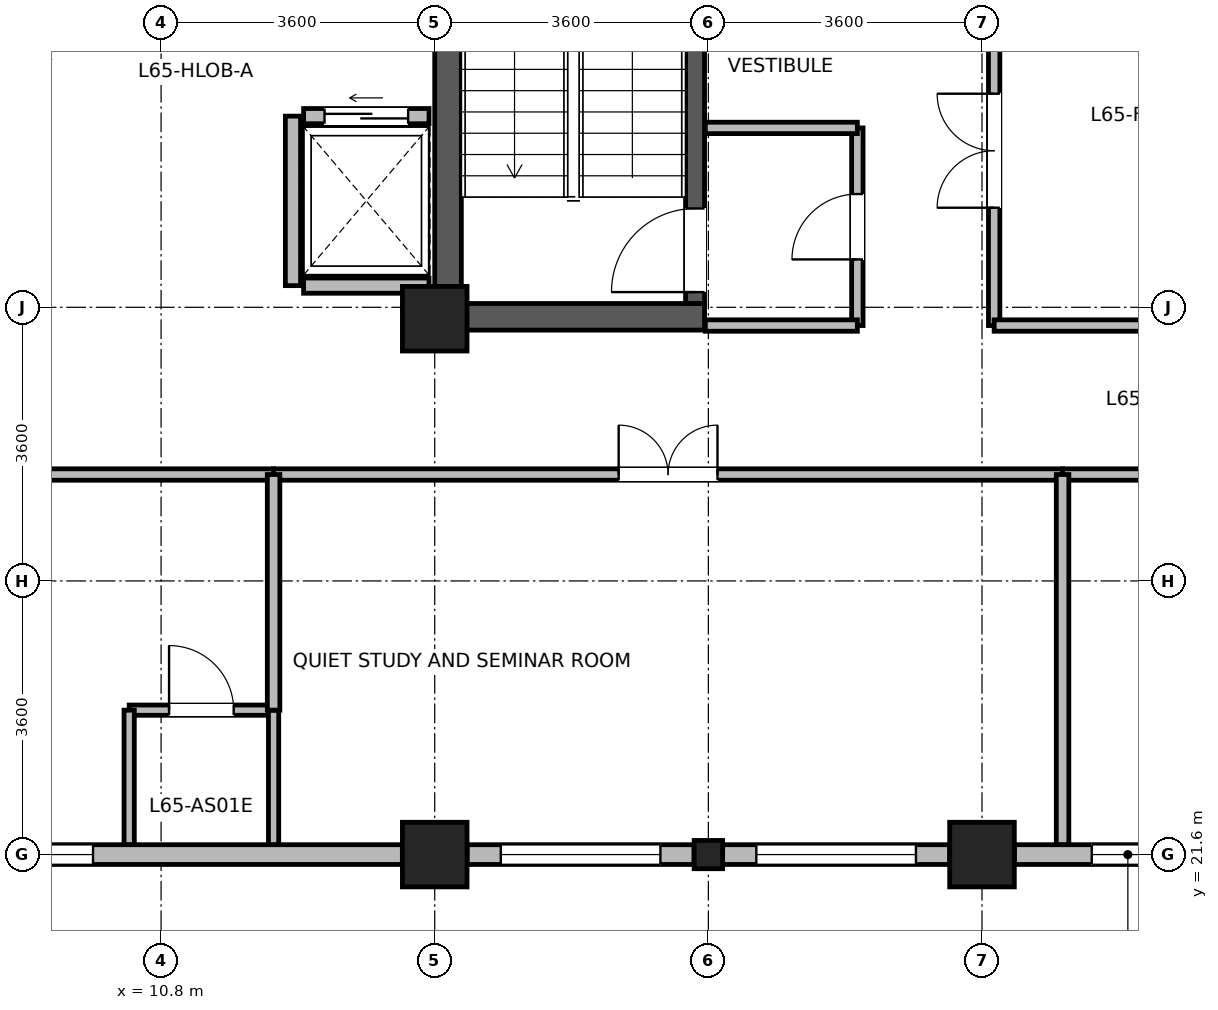
"""IFC4 building model, lengths in metres.
Left out: names, types, materials, properties, quantities, classifications, styles, units other than length and angle.
Written with IfcOpenShell. Run it as: python <this file> out.ifc"""

import sys

from ifc_helpers import new_model, si_unit, direction, frame, frame_2d, origin, origin_2d, place, context, subcontext, project, spatial, rectangle, i_section, extrude, source, transform, mapped, element, fill, save


model = new_model("IFC4")
c1 = context("Model", 3, precision=1e-05, world=origin(), true_north=direction((0.0, 1.0)))
c2 = subcontext(c1, "Body", "Model", "MODEL_VIEW")
j1 = project(units=[si_unit("LENGTHUNIT", "METRE"), si_unit("PLANEANGLEUNIT", "RADIAN")], contexts=[c1])
p1 = place(None, origin())
s1 = spatial("IfcSite", under=j1, at=p1, CompositionType="ELEMENT")
p2 = place(p1, origin())
s2 = spatial("IfcBuilding", under=s1, at=p2, CompositionType="ELEMENT")
p3 = place(p2, frame((0.0, 0.0, 253.6)))
s3 = spatial("IfcBuildingStorey", under=s2, at=p3, CompositionType="ELEMENT", Elevation=253.6)
p4 = place(p3, frame((14.575, 28.5, 0.0), z_axis=(0.0, 0.0, 1.0), x_axis=(0.0, 1.0, 0.0)))
e1 = element("IfcWall", 1, at=p4, inside=s3, PredefinedType="SHEAR", context=c2, shape_type="SweptSolid", body=[
    extrude(rectangle(XDim=7.7, YDim=0.35, at=frame_2d((3.85, 0.0))), origin(), (0.0, 0.0, 1.0), 3.475),
])
p5 = place(p3, frame((14.75, 28.675, 0.0), z_axis=(0.0, 0.0, 1.0), x_axis=(1.0, 0.0, 0.0)))
e2 = element("IfcWall", 2, at=p5, inside=s3, PredefinedType="SHEAR", context=c2, shape_type="SweptSolid", body=[
    extrude(rectangle(XDim=3.2, YDim=0.35, at=frame_2d((1.6, 0.0))), origin(), (0.0, 0.0, 1.0), 3.475),
])
p6 = place(p3, frame((17.825, 28.85, 0.0), z_axis=(0.0, 0.0, 1.0), x_axis=(0.0, 1.0, 0.0)))
e3 = element("IfcWall", 3, at=p6, inside=s3, PredefinedType="SHEAR", context=c2, shape_type="SweptSolid", body=[
    extrude(rectangle(XDim=7.0, YDim=0.25, at=frame_2d((3.5, 0.0))), origin(), (0.0, 0.0, 1.0), 3.475),
])
p7 = place(p6, frame((0.15, 0.0, 0.0)))
e4 = element("IfcOpeningElement", 4, at=p7, cuts=e3, PredefinedType="OPENING", context=c2, shape_type="SweptSolid", body=[
    extrude(rectangle(XDim=1.1, YDim=2.08, at=frame_2d((0.55, 1.04))), frame((0.0, 0.135, 0.0), z_axis=(0.0, -1.0, 0.0), x_axis=(1.0, 0.0, 0.0)), (0.0, 0.0, 1.0), 0.27),
])
m1 = source(origin(), c2, "Body", "SweptSolid", [
    extrude(rectangle(XDim=0.85, YDim=0.85, at=origin_2d()), origin(), (0.0, 0.0, 1.0), 3.7),
])
for number, where, z_axis, x_axis in (
    (5, (14.4, 21.6, 0.0), (0.0, 0.0, 1.0), (1.0, 0.0, 0.0)),
    (6, (14.4, 28.65, 0.0), (0.0, 0.0, 1.0), (1.0, 0.0, 0.0)),
    (7, (21.6, 21.6, 0.0), (0.0, 0.0, 1.0), (1.0, 0.0, 0.0)),
):
    element("IfcColumn", number, at=place(p3, frame(where, z_axis=z_axis, x_axis=x_axis)), inside=s3, PredefinedType="COLUMN", context=c2, shape_type="MappedRepresentation", body=[
        mapped(m1, transform((0.0, 0.0, 0.0), x_axis=(1.0, 0.0, 0.0), y_axis=(0.0, 1.0, 0.0), z_axis=(0.0, 0.0, 1.0), scale=1.0)),
    ])
m2 = source(origin(), c2, "Body", "SweptSolid", [
    extrude(i_section(OverallWidth=0.374, OverallDepth=0.372, WebThickness=0.015, FlangeThickness=0.026, FilletRadius=0.015, at=origin_2d()), origin(), (0.0, 0.0, 1.0), 3.7),
])
p8 = place(p3, frame((18.0, 21.6, 0.0), z_axis=(0.0, 0.0, 1.0), x_axis=(1.0, 0.0, 0.0)))
e8 = element("IfcColumn", 8, at=p8, inside=s3, PredefinedType="COLUMN", context=c2, shape_type="MappedRepresentation", body=[
    mapped(m2, transform((0.0, 0.0, 0.0), x_axis=(1.0, 0.0, 0.0), y_axis=(0.0, 1.0, 0.0), z_axis=(0.0, 0.0, 1.0), scale=1.0)),
])
p9 = place(p3, frame((13.974, 21.6, 0.0), z_axis=(0.0, 0.0, 1.0), x_axis=(-1.0, 0.0, 0.0)))
e9 = element("IfcWall", 9, at=p9, inside=s3, PredefinedType="STANDARD", context=c2, shape_type="SweptSolid", body=[
    extrude(rectangle(XDim=10.239, YDim=0.26, at=frame_2d((5.12, 0.0))), origin(), (0.0, 0.0, 1.0), 3.455),
])
p10 = place(p9, frame((4.07, 0.0, 0.85)))
e10 = element("IfcOpeningElement", 10, at=p10, cuts=e9, PredefinedType="OPENING", context=c2, shape_type="SweptSolid", body=[
    extrude(rectangle(XDim=2.1, YDim=1.95, at=frame_2d((1.05, 0.975))), frame((0.0, 0.14, 0.0), z_axis=(0.0, -1.0, 0.0), x_axis=(1.0, 0.0, 0.0)), (0.0, 0.0, 1.0), 0.28),
])
p11 = place(p9, frame((7.482, 0.0, 0.85)))
e11 = element("IfcOpeningElement", 11, at=p11, cuts=e9, PredefinedType="OPENING", context=c2, shape_type="SweptSolid", body=[
    extrude(rectangle(XDim=2.1, YDim=1.95, at=frame_2d((1.05, 0.975))), frame((0.0, 0.14, 0.0), z_axis=(0.0, -1.0, 0.0), x_axis=(1.0, 0.0, 0.0)), (0.0, 0.0, 1.0), 0.28),
])
p12 = place(p3, frame((17.812, 21.6, 0.0), z_axis=(0.0, 0.0, 1.0), x_axis=(-1.0, 0.0, 0.0)))
e12 = element("IfcWall", 12, at=p12, inside=s3, PredefinedType="STANDARD", context=c2, shape_type="SweptSolid", body=[
    extrude(rectangle(XDim=2.986, YDim=0.26, at=frame_2d((1.493, 0.0))), origin(), (0.0, 0.0, 1.0), 3.055),
])
p13 = place(p12, frame((0.443, 0.0, 0.85)))
e13 = element("IfcOpeningElement", 13, at=p13, cuts=e12, PredefinedType="OPENING", context=c2, shape_type="SweptSolid", body=[
    extrude(rectangle(XDim=2.1, YDim=1.95, at=frame_2d((1.05, 0.975))), frame((0.0, 0.14, 0.0), z_axis=(0.0, -1.0, 0.0), x_axis=(1.0, 0.0, 0.0)), (0.0, 0.0, 1.0), 0.28),
])
p14 = place(p3, frame((21.174, 21.6, 0.0), z_axis=(0.0, 0.0, 1.0), x_axis=(-1.0, 0.0, 0.0)))
e14 = element("IfcWall", 14, at=p14, inside=s3, PredefinedType="STANDARD", context=c2, shape_type="SweptSolid", body=[
    extrude(rectangle(XDim=2.986, YDim=0.26, at=frame_2d((1.493, 0.0))), origin(), (0.0, 0.0, 1.0), 3.055),
])
p15 = place(p14, frame((0.443, 0.0, 0.85)))
e15 = element("IfcOpeningElement", 15, at=p15, cuts=e14, PredefinedType="OPENING", context=c2, shape_type="SweptSolid", body=[
    extrude(rectangle(XDim=2.1, YDim=1.95, at=frame_2d((1.05, 0.975))), frame((0.0, 0.14, 0.0), z_axis=(0.0, -1.0, 0.0), x_axis=(1.0, 0.0, 0.0)), (0.0, 0.0, 1.0), 0.28),
])
p16 = place(p3, frame((25.012, 21.6, 0.0), z_axis=(0.0, 0.0, 1.0), x_axis=(-1.0, 0.0, 0.0)))
e16 = element("IfcWall", 16, at=p16, inside=s3, PredefinedType="STANDARD", context=c2, shape_type="SweptSolid", body=[
    extrude(rectangle(XDim=2.986, YDim=0.26, at=frame_2d((1.493, 0.0))), origin(), (0.0, 0.0, 1.0), 3.055),
])
p17 = place(p16, frame((1.018, 0.0, 0.85)))
e17 = element("IfcOpeningElement", 17, at=p17, cuts=e16, PredefinedType="OPENING", context=c2, shape_type="SweptSolid", body=[
    extrude(rectangle(XDim=0.95, YDim=1.75, at=frame_2d((0.475, 0.875))), frame((0.0, 0.14, 0.0), z_axis=(0.0, -1.0, 0.0), x_axis=(1.0, 0.0, 0.0)), (0.0, 0.0, 1.0), 0.28),
])
p18 = place(p3, frame((12.675, 29.085, 0.0), z_axis=(0.0, 0.0, 1.0), x_axis=(1.0, 0.0, 0.0)))
e18 = element("IfcWall", 18, at=p18, inside=s3, PredefinedType="PARTITIONING", context=c2, shape_type="SweptSolid", body=[
    extrude(rectangle(XDim=1.65, YDim=0.2, at=frame_2d((0.825, 0.0))), origin(), (0.0, 0.0, 1.0), 3.455),
])
p19 = place(p3, frame((12.675, 31.315, 0.0), z_axis=(0.0, 0.0, 1.0), x_axis=(1.0, 0.0, 0.0)))
e19 = element("IfcWall", 19, at=p19, inside=s3, PredefinedType="PARTITIONING", context=c2, shape_type="SweptSolid", body=[
    extrude(rectangle(XDim=1.65, YDim=0.2, at=frame_2d((0.825, 0.0))), origin(), (0.0, 0.0, 1.0), 3.455),
])
p20 = place(p19, frame((0.275, 0.0, 0.0)))
e20 = element("IfcOpeningElement", 20, at=p20, cuts=e19, PredefinedType="OPENING", context=c2, shape_type="SweptSolid", body=[
    extrude(rectangle(XDim=1.1, YDim=2.12, at=frame_2d((0.55, 1.06))), frame((0.0, 0.11, 0.0), z_axis=(0.0, -1.0, 0.0), x_axis=(1.0, 0.0, 0.0)), (0.0, 0.0, 1.0), 0.22),
])
p21 = place(p3, frame((12.535, 29.085, 0.0), z_axis=(0.0, 0.0, 1.0), x_axis=(0.0, 1.0, 0.0)))
e21 = element("IfcWall", 21, at=p21, inside=s3, PredefinedType="PARTITIONING", context=c2, shape_type="SweptSolid", body=[
    extrude(rectangle(XDim=2.23, YDim=0.2, at=frame_2d((1.115, 0.0))), origin(), (0.0, 0.0, 1.0), 3.455),
])
p22 = place(p3, frame((10.38, 23.5, 0.0), z_axis=(0.0, 0.0, 1.0), x_axis=(1.0, 0.0, 0.0)))
e22 = element("IfcWall", 22, at=p22, inside=s3, PredefinedType="PARTITIONING", context=c2, shape_type="SweptSolid", body=[
    extrude(rectangle(XDim=1.9, YDim=0.135, at=frame_2d((0.95, 0.0))), origin(), (0.0, 0.0, 1.0), 3.455),
])
p23 = place(p22, frame((0.525, 0.0, 0.0)))
e23 = element("IfcOpeningElement", 23, at=p23, cuts=e22, PredefinedType="OPENING", context=c2, shape_type="SweptSolid", body=[
    extrude(rectangle(XDim=0.85, YDim=2.04, at=frame_2d((0.425, 1.02))), frame((0.0, 0.078, 0.0), z_axis=(0.0, -1.0, 0.0), x_axis=(1.0, 0.0, 0.0)), (0.0, 0.0, 1.0), 0.155),
])
for number, where, z_axis, x_axis in (
    (24, (10.38, 21.732, 0.0), (0.0, 0.0, 1.0), (0.0, 1.0, 0.0)),
    (25, (12.28, 21.732, 0.0), (0.0, 0.0, 1.0), (0.0, 1.0, 0.0)),
):
    element("IfcWall", number, at=place(p3, frame(where, z_axis=z_axis, x_axis=x_axis)), inside=s3, PredefinedType="PARTITIONING", context=c2, shape_type="SweptSolid", body=[
        extrude(rectangle(XDim=1.768, YDim=0.135, at=frame_2d((0.884, 0.0))), origin(), (0.0, 0.0, 1.0), 3.455),
    ])
p24 = place(p3, frame((12.28, 26.6, 0.0), z_axis=(0.0, 0.0, 1.0), x_axis=(1.0, 0.0, 0.0)))
e26 = element("IfcWall", 26, at=p24, inside=s3, PredefinedType="PARTITIONING", context=c2, shape_type="SweptSolid", body=[
    extrude(rectangle(XDim=10.38, YDim=0.15, at=frame_2d((5.19, 0.0))), origin(), (0.0, 0.0, 1.0), 3.455),
])
p25 = place(p24, frame((4.54, 0.0, 0.0)))
e27 = element("IfcOpeningElement", 27, at=p25, cuts=e26, PredefinedType="OPENING", context=c2, shape_type="SweptSolid", body=[
    extrude(rectangle(XDim=1.3, YDim=2.12, at=frame_2d((0.65, 1.06))), frame((0.0, 0.085, 0.0), z_axis=(0.0, -1.0, 0.0), x_axis=(1.0, 0.0, 0.0)), (0.0, 0.0, 1.0), 0.17),
])
p26 = place(p3, frame((3.732, 26.6, 0.0), z_axis=(0.0, 0.0, 1.0), x_axis=(1.0, 0.0, 0.0)))
e28 = element("IfcWall", 28, at=p26, inside=s3, PredefinedType="PARTITIONING", context=c2, shape_type="SweptSolid", body=[
    extrude(rectangle(XDim=8.548, YDim=0.15, at=frame_2d((4.274, 0.0))), origin(), (0.0, 0.0, 1.0), 3.455),
])
p27 = place(p26, frame((3.799, 0.0, 0.0)))
e29 = element("IfcOpeningElement", 29, at=p27, cuts=e28, PredefinedType="OPENING", context=c2, shape_type="SweptSolid", body=[
    extrude(rectangle(XDim=0.95, YDim=2.1, at=frame_2d((0.475, 1.05))), frame((0.0, 0.085, 0.0), z_axis=(0.0, -1.0, 0.0), x_axis=(1.0, 0.0, 0.0)), (0.0, 0.0, 1.0), 0.17),
])
p28 = place(p3, frame((22.66, 26.6, 0.0), z_axis=(0.0, 0.0, 1.0), x_axis=(1.0, 0.0, 0.0)))
e30 = element("IfcWall", 30, at=p28, inside=s3, PredefinedType="PARTITIONING", context=c2, shape_type="SweptSolid", body=[
    extrude(rectangle(XDim=8.32, YDim=0.15, at=frame_2d((4.16, 0.0))), origin(), (0.0, 0.0, 1.0), 3.455),
])
p29 = place(p28, frame((3.51, 0.0, 0.0)))
e31 = element("IfcOpeningElement", 31, at=p29, cuts=e30, PredefinedType="OPENING", context=c2, shape_type="SweptSolid", body=[
    extrude(rectangle(XDim=1.3, YDim=2.12, at=frame_2d((0.65, 1.06))), frame((0.0, 0.085, 0.0), z_axis=(0.0, -1.0, 0.0), x_axis=(1.0, 0.0, 0.0)), (0.0, 0.0, 1.0), 0.17),
])
p30 = place(p3, frame((19.96, 28.56, 0.0), z_axis=(0.0, 0.0, 1.0), x_axis=(0.0, 1.0, 0.0)))
e32 = element("IfcWall", 32, at=p30, inside=s3, PredefinedType="PARTITIONING", context=c2, shape_type="SweptSolid", body=[
    extrude(rectangle(XDim=2.6, YDim=0.15, at=frame_2d((1.3, 0.0))), origin(), (0.0, 0.0, 1.0), 3.455),
])
p31 = place(p30, frame((0.87, 0.0, 0.0)))
e33 = element("IfcOpeningElement", 33, at=p31, cuts=e32, PredefinedType="OPENING", context=c2, shape_type="SweptSolid", body=[
    extrude(rectangle(XDim=0.86, YDim=2.02, at=frame_2d((0.43, 1.01))), frame((0.0, 0.085, 0.0), z_axis=(0.0, -1.0, 0.0), x_axis=(1.0, 0.0, 0.0)), (0.0, 0.0, 1.0), 0.17),
])
p32 = place(p3, frame((17.96, 28.56, 0.0), z_axis=(0.0, 0.0, 1.0), x_axis=(1.0, 0.0, 0.0)))
e34 = element("IfcWall", 34, at=p32, inside=s3, PredefinedType="PARTITIONING", context=c2, shape_type="SweptSolid", body=[
    extrude(rectangle(XDim=2.0, YDim=0.15, at=frame_2d((1.0, 0.0))), origin(), (0.0, 0.0, 1.0), 2.555),
])
p33 = place(p3, frame((17.96, 31.16, 0.0), z_axis=(0.0, 0.0, 1.0), x_axis=(1.0, 0.0, 0.0)))
e35 = element("IfcWall", 35, at=p33, inside=s3, PredefinedType="PARTITIONING", context=c2, shape_type="SweptSolid", body=[
    extrude(rectangle(XDim=2.0, YDim=0.15, at=frame_2d((1.0, 0.0))), origin(), (0.0, 0.0, 1.0), 3.455),
])
p34 = place(p3, frame((22.66, 21.732, 0.0), z_axis=(0.0, 0.0, 1.0), x_axis=(0.0, 1.0, 0.0)))
e36 = element("IfcWall", 36, at=p34, inside=s3, PredefinedType="PARTITIONING", context=c2, shape_type="SweptSolid", body=[
    extrude(rectangle(XDim=4.868, YDim=0.165, at=frame_2d((2.434, 0.0))), origin(), (0.0, 0.0, 1.0), 3.455),
])
p35 = place(p3, frame((21.76, 28.56, 0.0), z_axis=(0.0, 0.0, 1.0), x_axis=(0.0, 1.0, 0.0)))
e37 = element("IfcWall", 37, at=p35, inside=s3, PredefinedType="PARTITIONING", context=c2, shape_type="SweptSolid", body=[
    extrude(rectangle(XDim=4.6, YDim=0.15, at=frame_2d((2.3, 0.0))), origin(), (0.0, 0.0, 1.0), 3.455),
])
p36 = place(p35, frame((1.55, 0.0, 0.0)))
e38 = element("IfcOpeningElement", 38, at=p36, cuts=e37, PredefinedType="OPENING", context=c2, shape_type="SweptSolid", body=[
    extrude(rectangle(XDim=1.5, YDim=2.1, at=frame_2d((0.75, 1.05))), frame((0.0, 0.085, 0.0), z_axis=(0.0, -1.0, 0.0), x_axis=(1.0, 0.0, 0.0)), (0.0, 0.0, 1.0), 0.17),
])
p37 = place(p3, frame((21.76, 28.56, 0.0), z_axis=(0.0, 0.0, 1.0), x_axis=(1.0, 0.0, 0.0)))
e39 = element("IfcWall", 39, at=p37, inside=s3, PredefinedType="PARTITIONING", context=c2, shape_type="SweptSolid", body=[
    extrude(rectangle(XDim=3.48, YDim=0.15, at=frame_2d((1.74, 0.0))), origin(), (0.0, 0.0, 1.0), 2.555),
])
p38 = place(p3, frame((12.28, 23.5, 0.0), z_axis=(0.0, 0.0, 1.0), x_axis=(0.0, 1.0, 0.0)))
e40 = element("IfcWall", 40, at=p38, inside=s3, PredefinedType="PARTITIONING", context=c2, shape_type="SweptSolid", body=[
    extrude(rectangle(XDim=3.1, YDim=0.165, at=frame_2d((1.55, 0.0))), origin(), (0.0, 0.0, 1.0), 3.455),
])
p39 = place(p10, origin())
e41 = element("IfcWindow", 41, at=p39, inside=s3, PartitioningType="SINGLE_PANEL", PredefinedType="WINDOW", context=c2, shape_type="SweptSolid", body=[
    extrude(rectangle(XDim=2.1, YDim=1.95, at=frame_2d((1.05, 0.975))), frame((0.0, 0.03, 0.0), z_axis=(0.0, -1.0, 0.0), x_axis=(1.0, 0.0, 0.0)), (0.0, 0.0, 1.0), 0.06),
])
fill(e10, e41)
p40 = place(p13, origin())
e42 = element("IfcWindow", 42, at=p40, inside=s3, PartitioningType="SINGLE_PANEL", PredefinedType="WINDOW", context=c2, shape_type="SweptSolid", body=[
    extrude(rectangle(XDim=2.1, YDim=1.95, at=frame_2d((1.05, 0.975))), frame((0.0, 0.03, 0.0), z_axis=(0.0, -1.0, 0.0), x_axis=(1.0, 0.0, 0.0)), (0.0, 0.0, 1.0), 0.06),
])
fill(e13, e42)
p41 = place(p15, origin())
e43 = element("IfcWindow", 43, at=p41, inside=s3, PartitioningType="SINGLE_PANEL", PredefinedType="WINDOW", context=c2, shape_type="SweptSolid", body=[
    extrude(rectangle(XDim=2.1, YDim=1.95, at=frame_2d((1.05, 0.975))), frame((0.0, 0.03, 0.0), z_axis=(0.0, -1.0, 0.0), x_axis=(1.0, 0.0, 0.0)), (0.0, 0.0, 1.0), 0.06),
])
fill(e15, e43)
p42 = place(p17, origin())
e44 = element("IfcWindow", 44, at=p42, inside=s3, PartitioningType="SINGLE_PANEL", PredefinedType="WINDOW", context=c2, shape_type="SweptSolid", body=[
    extrude(rectangle(XDim=0.95, YDim=1.75, at=frame_2d((0.475, 0.875))), frame((0.0, 0.03, 0.0), z_axis=(0.0, -1.0, 0.0), x_axis=(1.0, 0.0, 0.0)), (0.0, 0.0, 1.0), 0.06),
])
fill(e17, e44)
p43 = place(p7, origin())
e45 = element("IfcDoor", 45, at=p43, inside=s3, OperationType="SINGLE_SWING_LEFT", PredefinedType="DOOR", context=c2, shape_type="SweptSolid", body=[
    extrude(rectangle(XDim=1.1, YDim=2.08, at=frame_2d((0.55, 1.04))), frame((0.0, 0.025, 0.0), z_axis=(0.0, -1.0, 0.0), x_axis=(1.0, 0.0, 0.0)), (0.0, 0.0, 1.0), 0.05),
])
fill(e4, e45)
p44 = place(p20, origin())
e46 = element("IfcDoor", 46, at=p44, inside=s3, OperationType="SLIDING_TO_LEFT", PredefinedType="DOOR", context=c2, shape_type="SweptSolid", body=[
    extrude(rectangle(XDim=1.1, YDim=2.12, at=frame_2d((0.55, 1.06))), frame((0.0, 0.025, 0.0), z_axis=(0.0, -1.0, 0.0), x_axis=(1.0, 0.0, 0.0)), (0.0, 0.0, 1.0), 0.05),
])
fill(e20, e46)
p45 = place(p23, origin())
e47 = element("IfcDoor", 47, at=p45, inside=s3, OperationType="SINGLE_SWING_LEFT", PredefinedType="DOOR", context=c2, shape_type="SweptSolid", body=[
    extrude(rectangle(XDim=0.85, YDim=2.04, at=frame_2d((0.425, 1.02))), frame((0.0, 0.025, 0.0), z_axis=(0.0, -1.0, 0.0), x_axis=(1.0, 0.0, 0.0)), (0.0, 0.0, 1.0), 0.05),
])
fill(e23, e47)
p46 = place(p25, origin())
e48 = element("IfcDoor", 48, at=p46, inside=s3, OperationType="DOUBLE_DOOR_SINGLE_SWING", PredefinedType="DOOR", context=c2, shape_type="SweptSolid", body=[
    extrude(rectangle(XDim=1.3, YDim=2.12, at=frame_2d((0.65, 1.06))), frame((0.0, 0.025, 0.0), z_axis=(0.0, -1.0, 0.0), x_axis=(1.0, 0.0, 0.0)), (0.0, 0.0, 1.0), 0.05),
])
fill(e27, e48)
p47 = place(p31, origin())
e49 = element("IfcDoor", 49, at=p47, inside=s3, OperationType="SINGLE_SWING_LEFT", PredefinedType="DOOR", context=c2, shape_type="SweptSolid", body=[
    extrude(rectangle(XDim=0.86, YDim=2.02, at=frame_2d((0.43, 1.01))), frame((0.0, 0.025, 0.0), z_axis=(0.0, -1.0, 0.0), x_axis=(1.0, 0.0, 0.0)), (0.0, 0.0, 1.0), 0.05),
])
fill(e33, e49)
p48 = place(p36, origin())
e50 = element("IfcDoor", 50, at=p48, inside=s3, OperationType="DOUBLE_DOOR_SINGLE_SWING", PredefinedType="DOOR", context=c2, shape_type="SweptSolid", body=[
    extrude(rectangle(XDim=1.5, YDim=2.1, at=frame_2d((0.75, 1.05))), frame((0.0, 0.025, 0.0), z_axis=(0.0, -1.0, 0.0), x_axis=(1.0, 0.0, 0.0)), (0.0, 0.0, 1.0), 0.05),
])
fill(e38, e50)
save(model, sys.argv[1])
